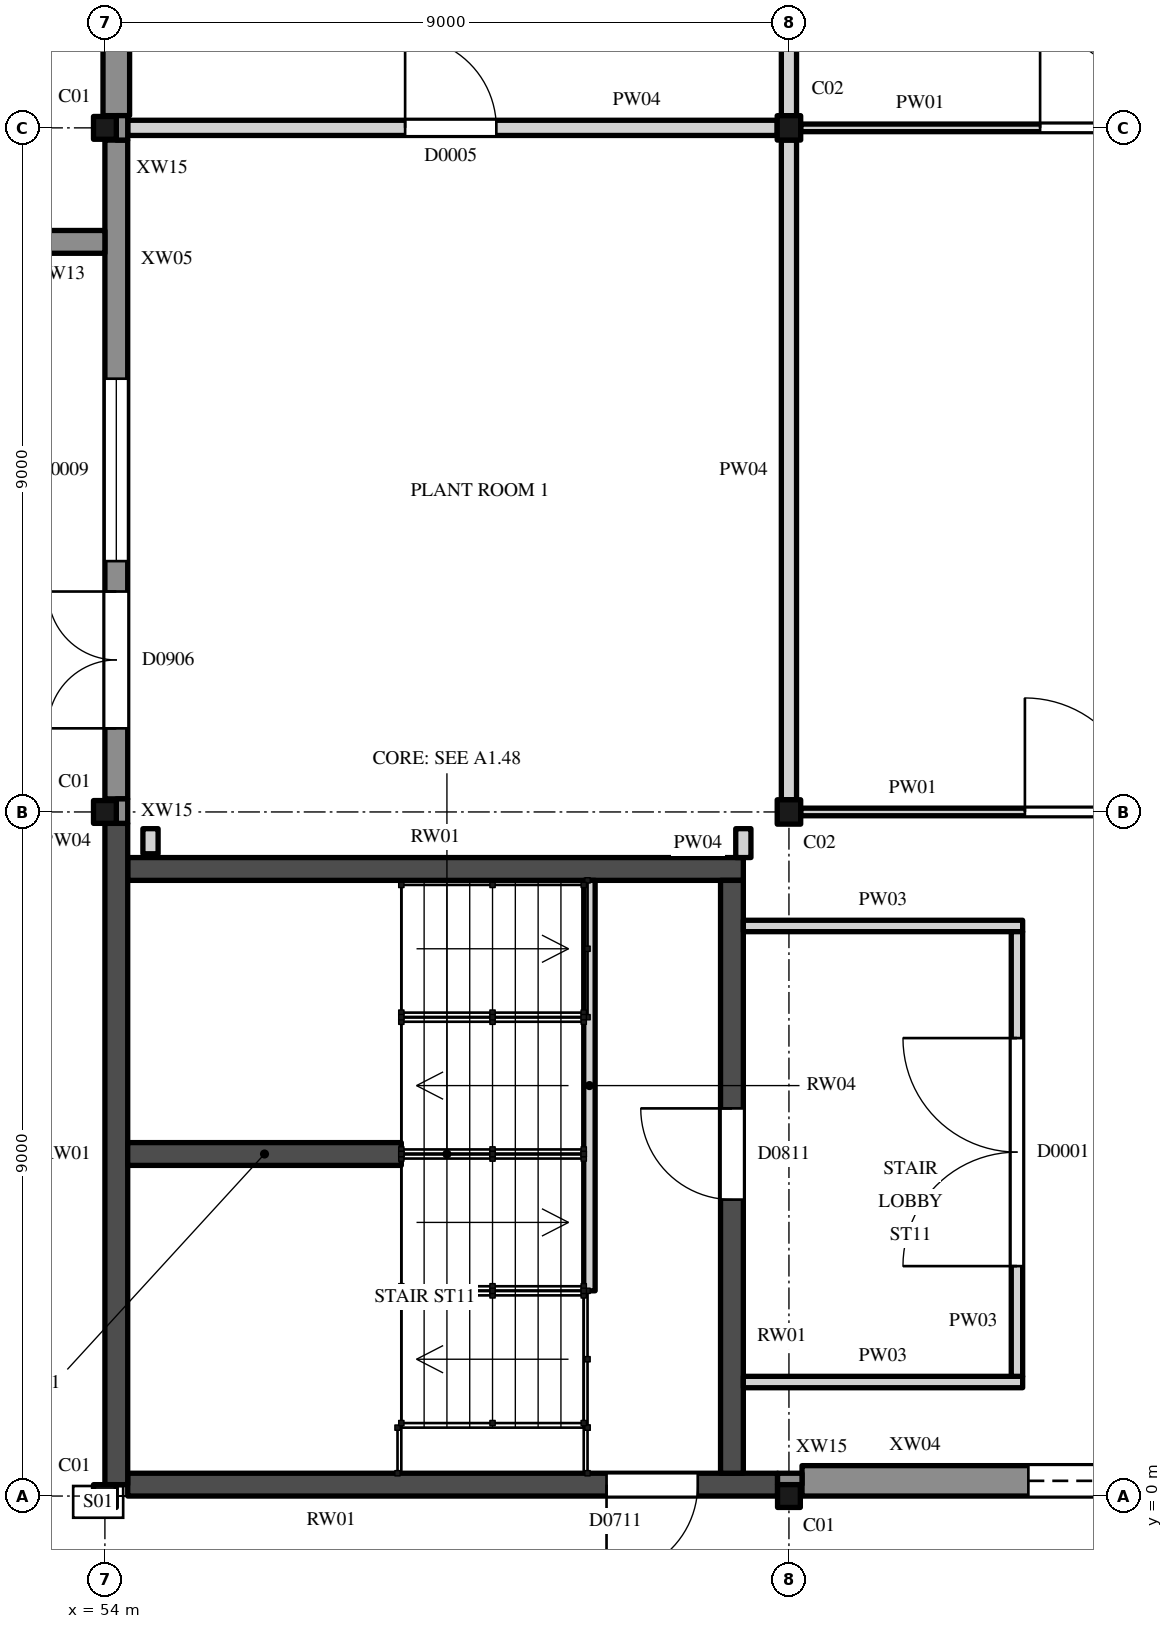
"""IFC4 building model, lengths in metres.
Left out: names, types, materials, properties, quantities, classifications, styles, units other than length and angle.
Written with IfcOpenShell. Run it as: python <this file> out.ifc"""

import sys

from ifc_helpers import new_model, si_unit, direction, frame, frame_2d, origin, origin_2d, place, context, subcontext, project, spatial, polyline, rectangle, hollow_rectangle, i_section, outline, extrude, element, fill, save


model = new_model("IFC4")
c1 = context("Model", 3, precision=1e-05, world=origin(), true_north=direction((0.0, 1.0)))
c2 = subcontext(c1, "Body", "Model", "MODEL_VIEW")
j1 = project(units=[si_unit("LENGTHUNIT", "METRE"), si_unit("PLANEANGLEUNIT", "RADIAN")], contexts=[c1])
p1 = place(None, origin())
s1 = spatial("IfcSite", under=j1, at=p1, CompositionType="ELEMENT")
p2 = place(p1, origin())
s2 = spatial("IfcBuilding", under=s1, at=p2, CompositionType="ELEMENT")
p3 = place(p2, origin())
s3 = spatial("IfcBuildingStorey", under=s2, at=p3, CompositionType="ELEMENT", Elevation=0.0)
for number, where, z_axis, x_axis in (
    (1, (54.0, 0.0, 0.0), (0.0, 0.0, 1.0), (1.0, 0.0, 0.0)),
    (2, (63.0, 0.0, 0.0), (0.0, 0.0, 1.0), (1.0, 0.0, 0.0)),
    (3, (54.0, 9.0, 0.0), (0.0, 0.0, 1.0), (1.0, 0.0, 0.0)),
):
    element("IfcColumn", number, at=place(p3, frame(where, z_axis=z_axis, x_axis=x_axis)), inside=s3, PredefinedType="COLUMN", context=c2, shape_type="SweptSolid", body=[
        extrude(hollow_rectangle(XDim=0.3, YDim=0.3, WallThickness=0.012, InnerFilletRadius=0.019, OuterFilletRadius=0.031, at=origin_2d()), origin(), (0.0, 0.0, 1.0), 6.0),
    ])
p4 = place(p3, frame((63.0, 9.0, 0.0), z_axis=(0.0, 0.0, 1.0), x_axis=(1.0, 0.0, 0.0)))
e4 = element("IfcColumn", 4, at=p4, inside=s3, PredefinedType="COLUMN", context=c2, shape_type="SweptSolid", body=[
    extrude(i_section(OverallWidth=0.309, OverallDepth=0.321, WebThickness=0.014, FlangeThickness=0.022, FilletRadius=0.017, at=origin_2d()), origin(), (0.0, 0.0, 1.0), 6.0),
])
p5 = place(p3, frame((54.0, 18.0, 0.0), z_axis=(0.0, 0.0, 1.0), x_axis=(1.0, 0.0, 0.0)))
e5 = element("IfcColumn", 5, at=p5, inside=s3, PredefinedType="COLUMN", context=c2, shape_type="SweptSolid", body=[
    extrude(hollow_rectangle(XDim=0.3, YDim=0.3, WallThickness=0.012, InnerFilletRadius=0.019, OuterFilletRadius=0.031, at=origin_2d()), origin(), (0.0, 0.0, 1.0), 6.0),
])
p6 = place(p3, frame((63.0, 18.0, 0.0), z_axis=(0.0, 0.0, 1.0), x_axis=(1.0, 0.0, 0.0)))
e6 = element("IfcColumn", 6, at=p6, inside=s3, PredefinedType="COLUMN", context=c2, shape_type="SweptSolid", body=[
    extrude(i_section(OverallWidth=0.309, OverallDepth=0.321, WebThickness=0.014, FlangeThickness=0.022, FilletRadius=0.017, at=origin_2d()), origin(), (0.0, 0.0, 1.0), 6.0),
])
p7 = place(p3, frame((54.3, 0.15, 0.0), z_axis=(0.0, 0.0, 1.0), x_axis=(1.0, 0.0, 0.0)))
e7 = element("IfcWall", 7, at=p7, inside=s3, PredefinedType="SHEAR", context=c2, shape_type="SweptSolid", body=[
    extrude(rectangle(XDim=8.55, YDim=0.3, at=frame_2d((4.275, 0.0))), origin(), (0.0, 0.0, 1.0), 6.0),
])
p8 = place(p7, frame((6.3, 0.0, 0.0)))
e8 = element("IfcOpeningElement", 8, at=p8, cuts=e7, PredefinedType="OPENING", context=c2, shape_type="SweptSolid", body=[
    extrude(rectangle(XDim=1.2, YDim=2.1, at=frame_2d((0.6, 1.05))), frame((0.0, 0.16, 0.0), z_axis=(0.0, -1.0, 0.0), x_axis=(1.0, 0.0, 0.0)), (0.0, 0.0, 1.0), 0.32),
])
p9 = place(p3, frame((54.3, 8.25, 0.0), z_axis=(0.0, 0.0, 1.0), x_axis=(1.0, 0.0, 0.0)))
e9 = element("IfcWall", 9, at=p9, inside=s3, PredefinedType="SHEAR", context=c2, shape_type="SweptSolid", body=[
    extrude(rectangle(XDim=8.1, YDim=0.3, at=frame_2d((4.05, 0.0))), origin(), (0.0, 0.0, 1.0), 6.0),
])
p10 = place(p3, frame((54.15, 0.15, 0.0), z_axis=(0.0, 0.0, 1.0), x_axis=(0.0, 1.0, 0.0)))
e10 = element("IfcWall", 10, at=p10, inside=s3, PredefinedType="SHEAR", context=c2, shape_type="SweptSolid", body=[
    extrude(rectangle(XDim=8.7, YDim=0.3, at=frame_2d((4.35, 0.0))), origin(), (0.0, 0.0, 1.0), 6.0),
])
p11 = place(p3, frame((62.25, 0.3, 0.0), z_axis=(0.0, 0.0, 1.0), x_axis=(0.0, 1.0, 0.0)))
e11 = element("IfcWall", 11, at=p11, inside=s3, PredefinedType="SHEAR", context=c2, shape_type="SweptSolid", body=[
    extrude(rectangle(XDim=7.8, YDim=0.3, at=frame_2d((3.9, 0.0))), origin(), (0.0, 0.0, 1.0), 6.0),
])
p12 = place(p11, frame((3.6, 0.0, 0.0)))
e12 = element("IfcOpeningElement", 12, at=p12, cuts=e11, PredefinedType="OPENING", context=c2, shape_type="SweptSolid", body=[
    extrude(rectangle(XDim=1.2, YDim=2.1, at=frame_2d((0.6, 1.05))), frame((0.0, 0.16, 0.0), z_axis=(0.0, -1.0, 0.0), x_axis=(1.0, 0.0, 0.0)), (0.0, 0.0, 1.0), 0.32),
])
p13 = place(p3, frame((57.9, 4.5, 0.0), z_axis=(0.0, 0.0, 1.0), x_axis=(-1.0, 0.0, 0.0)))
e13 = element("IfcWall", 13, at=p13, inside=s3, PredefinedType="SHEAR", context=c2, shape_type="SweptSolid", body=[
    extrude(rectangle(XDim=3.6, YDim=0.3, at=frame_2d((1.8, 0.0))), origin(), (0.0, 0.0, 1.0), 6.0),
])
p14 = place(p3, frame((60.375, 2.7, 0.0), z_axis=(0.0, 0.0, 1.0), x_axis=(0.0, 1.0, 0.0)))
e14 = element("IfcWall", 14, at=p14, inside=s3, PredefinedType="STANDARD", context=c2, shape_type="SweptSolid", body=[
    extrude(rectangle(XDim=5.4, YDim=0.15, at=frame_2d((2.7, 0.0))), origin(), (0.0, 0.0, 1.0), 2.8),
])
p15 = place(p3, frame((63.172, 0.2, 0.0), z_axis=(0.0, 0.0, 1.0), x_axis=(1.0, 0.0, 0.0)))
e15 = element("IfcWall", 15, at=p15, inside=s3, PredefinedType="SOLIDWALL", context=c2, shape_type="SweptSolid", body=[
    extrude(rectangle(XDim=8.667, YDim=0.4, at=frame_2d((4.333, 0.0))), origin(), (0.0, 0.0, 1.0), 5.419),
])
p16 = place(p15, frame((2.978, 0.0, 0.0)))
e16 = element("IfcOpeningElement", 16, at=p16, cuts=e15, PredefinedType="OPENING", context=c2, shape_type="SweptSolid", body=[
    extrude(rectangle(XDim=4.5, YDim=4.5, at=frame_2d((2.25, 2.25))), frame((0.0, 0.21, 0.0), z_axis=(0.0, -1.0, 0.0), x_axis=(1.0, 0.0, 0.0)), (0.0, 0.0, 1.0), 0.42),
])
p17 = place(p3, frame((54.15, 9.172, 0.0), z_axis=(0.0, 0.0, 1.0), x_axis=(0.0, 1.0, 0.0)))
e17 = element("IfcWall", 17, at=p17, inside=s3, PredefinedType="SOLIDWALL", context=c2, shape_type="SweptSolid", body=[
    extrude(rectangle(XDim=8.667, YDim=0.3, at=frame_2d((4.333, 0.0))), origin(), (0.0, 0.0, 1.0), 5.292),
])
p18 = place(p17, frame((3.128, 0.0, 0.9)))
e18 = element("IfcOpeningElement", 18, at=p18, cuts=e17, PredefinedType="OPENING", context=c2, shape_type="SweptSolid", body=[
    extrude(rectangle(XDim=2.4, YDim=1.8, at=frame_2d((1.2, 0.9))), frame((0.0, 0.16, 0.0), z_axis=(0.0, -1.0, 0.0), x_axis=(1.0, 0.0, 0.0)), (0.0, 0.0, 1.0), 0.32),
])
p19 = place(p17, frame((0.928, 0.0, 0.0)))
e19 = element("IfcOpeningElement", 19, at=p19, cuts=e17, PredefinedType="OPENING", context=c2, shape_type="SweptSolid", body=[
    extrude(rectangle(XDim=1.8, YDim=2.4, at=frame_2d((0.9, 1.2))), frame((0.0, 0.16, 0.0), z_axis=(0.0, -1.0, 0.0), x_axis=(1.0, 0.0, 0.0)), (0.0, 0.0, 1.0), 0.32),
])
p20 = place(p3, frame((54.15, 18.161, 0.0), z_axis=(0.0, 0.0, 1.0), x_axis=(0.0, 1.0, 0.0)))
e20 = element("IfcWall", 20, at=p20, inside=s3, PredefinedType="SOLIDWALL", context=c2, shape_type="SweptSolid", body=[
    extrude(rectangle(XDim=8.667, YDim=0.35, at=frame_2d((4.333, 0.0))), origin(), (0.0, 0.0, 1.0), 5.292),
])
p21 = place(p20, frame((3.439, 0.0, 0.0)))
e21 = element("IfcOpeningElement", 21, at=p21, cuts=e20, PredefinedType="OPENING", context=c2, shape_type="SweptSolid", body=[
    extrude(rectangle(XDim=1.8, YDim=2.4, at=frame_2d((0.9, 1.2))), frame((0.0, 0.185, 0.0), z_axis=(0.0, -1.0, 0.0), x_axis=(1.0, 0.0, 0.0)), (0.0, 0.0, 1.0), 0.37),
])
for number, where, z_axis, x_axis in (
    (22, (62.85, 0.225, 0.0), (0.0, 0.0, 1.0), (1.0, 0.0, 0.0)),
    (23, (54.225, 8.85, 0.0), (0.0, 0.0, 1.0), (0.0, 1.0, 0.0)),
):
    element("IfcWall", number, at=place(p3, frame(where, z_axis=z_axis, x_axis=x_axis)), inside=s3, PredefinedType="SOLIDWALL", context=c2, shape_type="SweptSolid", body=[
        extrude(rectangle(XDim=0.322, YDim=0.15, at=frame_2d((0.161, 0.0))), origin(), (0.0, 0.0, 1.0), 6.0),
    ])
p22 = place(p3, frame((54.225, 17.839, 0.0), z_axis=(0.0, 0.0, 1.0), x_axis=(0.0, 1.0, 0.0)))
e24 = element("IfcWall", 24, at=p22, inside=s3, PredefinedType="SOLIDWALL", context=c2, shape_type="SweptSolid", body=[
    extrude(rectangle(XDim=0.322, YDim=0.15, at=frame_2d((0.161, 0.0))), origin(), (0.0, 0.0, 1.0), 5.292),
])
p23 = place(p3, frame((54.0, 16.5, 0.0), z_axis=(0.0, 0.0, 1.0), x_axis=(-1.0, 0.0, 0.0)))
e25 = element("IfcWall", 25, at=p23, inside=s3, PredefinedType="SOLIDWALL", context=c2, shape_type="SweptSolid", body=[
    extrude(outline(polyline([(0.0, 0.0), (1.2, 0.0), (1.2, 1.2), (0.0, 4.0), (0.0, 0.0)])), frame((0.0, 0.15, 0.0), z_axis=(0.0, -1.0, 0.0), x_axis=(1.0, 0.0, 0.0)), (0.0, 0.0, 1.0), 0.3),
])
for number, where, z_axis, x_axis in (
    (26, (62.4, 1.5, 0.0), (0.0, 0.0, 1.0), (1.0, 0.0, 0.0)),
    (27, (62.4, 7.5, 0.0), (0.0, 0.0, 1.0), (1.0, 0.0, 0.0)),
):
    element("IfcWall", number, at=place(p3, frame(where, z_axis=z_axis, x_axis=x_axis)), inside=s3, PredefinedType="PARTITIONING", context=c2, shape_type="SweptSolid", body=[
        extrude(rectangle(XDim=3.675, YDim=0.15, at=frame_2d((1.837, 0.0))), origin(), (0.0, 0.0, 1.0), 5.825),
    ])
p24 = place(p3, frame((63.155, 9.0, 0.0), z_axis=(0.0, 0.0, 1.0), x_axis=(1.0, 0.0, 0.0)))
e28 = element("IfcWall", 28, at=p24, inside=s3, PredefinedType="PARTITIONING", context=c2, shape_type="SweptSolid", body=[
    extrude(rectangle(XDim=8.691, YDim=0.1, at=frame_2d((4.345, 0.0))), origin(), (0.0, 0.0, 1.0), 5.419),
])
p25 = place(p24, frame((2.95, 0.0, 0.0)))
e29 = element("IfcOpeningElement", 29, at=p25, cuts=e28, PredefinedType="OPENING", context=c2, shape_type="SweptSolid", body=[
    extrude(rectangle(XDim=3.0, YDim=3.6, at=frame_2d((1.5, 1.8))), frame((0.0, 0.06, 0.0), z_axis=(0.0, -1.0, 0.0), x_axis=(1.0, 0.0, 0.0)), (0.0, 0.0, 1.0), 0.12),
])
p26 = place(p3, frame((54.3, 18.0, 0.0), z_axis=(0.0, 0.0, 1.0), x_axis=(1.0, 0.0, 0.0)))
e30 = element("IfcWall", 30, at=p26, inside=s3, PredefinedType="PARTITIONING", context=c2, shape_type="SweptSolid", body=[
    extrude(rectangle(XDim=8.545, YDim=0.2, at=frame_2d((4.273, 0.0))), origin(), (0.0, 0.0, 1.0), 5.419),
])
p27 = place(p26, frame((3.65, 0.0, 0.0)))
e31 = element("IfcOpeningElement", 31, at=p27, cuts=e30, PredefinedType="OPENING", context=c2, shape_type="SweptSolid", body=[
    extrude(rectangle(XDim=1.2, YDim=2.4, at=frame_2d((0.6, 1.2))), frame((0.0, 0.11, 0.0), z_axis=(0.0, -1.0, 0.0), x_axis=(1.0, 0.0, 0.0)), (0.0, 0.0, 1.0), 0.22),
])
p28 = place(p3, frame((63.155, 18.0, 0.0), z_axis=(0.0, 0.0, 1.0), x_axis=(1.0, 0.0, 0.0)))
e32 = element("IfcWall", 32, at=p28, inside=s3, PredefinedType="PARTITIONING", context=c2, shape_type="SweptSolid", body=[
    extrude(rectangle(XDim=8.691, YDim=0.1, at=frame_2d((4.345, 0.0))), origin(), (0.0, 0.0, 1.0), 5.419),
])
p29 = place(p28, frame((3.15, 0.0, 0.0)))
e33 = element("IfcOpeningElement", 33, at=p29, cuts=e32, PredefinedType="OPENING", context=c2, shape_type="SweptSolid", body=[
    extrude(rectangle(XDim=2.4, YDim=3.0, at=frame_2d((1.2, 1.5))), frame((0.0, 0.06, 0.0), z_axis=(0.0, -1.0, 0.0), x_axis=(1.0, 0.0, 0.0)), (0.0, 0.0, 1.0), 0.12),
])
p30 = place(p3, frame((54.6, 8.45, 0.0), z_axis=(0.0, 0.0, 1.0), x_axis=(0.0, 1.0, 0.0)))
e34 = element("IfcWall", 34, at=p30, inside=s3, PredefinedType="PARTITIONING", context=c2, shape_type="SweptSolid", body=[
    extrude(rectangle(XDim=0.33, YDim=0.2, at=frame_2d((0.165, 0.0))), origin(), (0.0, 0.0, 1.0), 5.825),
])
p31 = place(p3, frame((62.4, 8.4, 0.0), z_axis=(0.0, 0.0, 1.0), x_axis=(0.0, 1.0, 0.0)))
e35 = element("IfcWall", 35, at=p31, inside=s3, PredefinedType="PARTITIONING", context=c2, shape_type="SweptSolid", body=[
    extrude(rectangle(XDim=0.38, YDim=0.2, at=frame_2d((0.19, 0.0))), origin(), (0.0, 0.0, 1.0), 5.825),
])
for number, where, z_axis, x_axis in (
    (36, (63.0, 9.16, 0.0), (0.0, 0.0, 1.0), (0.0, 1.0, 0.0)),
    (37, (63.0, 18.16, 0.0), (0.0, 0.0, 1.0), (0.0, 1.0, 0.0)),
):
    element("IfcWall", number, at=place(p3, frame(where, z_axis=z_axis, x_axis=x_axis)), inside=s3, PredefinedType="PARTITIONING", context=c2, shape_type="SweptSolid", body=[
        extrude(rectangle(XDim=8.679, YDim=0.2, at=frame_2d((4.34, 0.0))), origin(), (0.0, 0.0, 1.0), 5.292),
    ])
p32 = place(p3, frame((66.0, 1.575, 0.0), z_axis=(0.0, 0.0, 1.0), x_axis=(0.0, 1.0, 0.0)))
e38 = element("IfcWall", 38, at=p32, inside=s3, PredefinedType="PARTITIONING", context=c2, shape_type="SweptSolid", body=[
    extrude(rectangle(XDim=5.85, YDim=0.15, at=frame_2d((2.925, 0.0))), origin(), (0.0, 0.0, 1.0), 5.825),
])
p33 = place(p32, frame((1.45, 0.0, 0.0)))
e39 = element("IfcOpeningElement", 39, at=p33, cuts=e38, PredefinedType="OPENING", context=c2, shape_type="SweptSolid", body=[
    extrude(rectangle(XDim=3.0, YDim=3.6, at=frame_2d((1.5, 1.8))), frame((0.0, 0.085, 0.0), z_axis=(0.0, -1.0, 0.0), x_axis=(1.0, 0.0, 0.0)), (0.0, 0.0, 1.0), 0.17),
])
p34 = place(p12, origin())
e40 = element("IfcDoor", 40, at=p34, inside=s3, OperationType="SINGLE_SWING_LEFT", PredefinedType="DOOR", context=c2, shape_type="SweptSolid", body=[
    extrude(rectangle(XDim=1.2, YDim=2.1, at=frame_2d((0.6, 1.05))), frame((0.0, 0.025, 0.0), z_axis=(0.0, -1.0, 0.0), x_axis=(1.0, 0.0, 0.0)), (0.0, 0.0, 1.0), 0.05),
])
fill(e12, e40)
p35 = place(p8, frame((1.2, 0.0, 0.0), z_axis=(0.0, 0.0, 1.0), x_axis=(-1.0, 0.0, 0.0)))
e41 = element("IfcDoor", 41, at=p35, inside=s3, OperationType="SINGLE_SWING_LEFT", PredefinedType="DOOR", context=c2, shape_type="SweptSolid", body=[
    extrude(rectangle(XDim=1.2, YDim=2.1, at=frame_2d((0.6, 1.05))), frame((0.0, 0.025, 0.0), z_axis=(0.0, -1.0, 0.0), x_axis=(1.0, 0.0, 0.0)), (0.0, 0.0, 1.0), 0.05),
])
fill(e8, e41)
p36 = place(p18, origin())
e42 = element("IfcWindow", 42, at=p36, inside=s3, PartitioningType="TRIPLE_PANEL_VERTICAL", PredefinedType="WINDOW", context=c2, shape_type="SweptSolid", body=[
    extrude(rectangle(XDim=2.4, YDim=1.8, at=frame_2d((1.2, 0.9))), frame((0.0, 0.03, 0.0), z_axis=(0.0, -1.0, 0.0), x_axis=(1.0, 0.0, 0.0)), (0.0, 0.0, 1.0), 0.06),
])
fill(e18, e42)
p37 = place(p16, frame((4.5, 0.0, 0.0), z_axis=(0.0, 0.0, 1.0), x_axis=(-1.0, 0.0, 0.0)))
e43 = element("IfcDoor", 43, at=p37, inside=s3, OperationType="ROLLINGUP", PredefinedType="DOOR", context=c2, shape_type="SweptSolid", body=[
    extrude(rectangle(XDim=4.5, YDim=4.5, at=frame_2d((2.25, 2.25))), frame((0.0, 0.025, 0.0), z_axis=(0.0, -1.0, 0.0), x_axis=(1.0, 0.0, 0.0)), (0.0, 0.0, 1.0), 0.05),
])
fill(e16, e43)
p38 = place(p19, origin())
e44 = element("IfcDoor", 44, at=p38, inside=s3, OperationType="DOUBLE_DOOR_SINGLE_SWING", PredefinedType="DOOR", context=c2, shape_type="SweptSolid", body=[
    extrude(rectangle(XDim=1.8, YDim=2.4, at=frame_2d((0.9, 1.2))), frame((0.0, 0.025, 0.0), z_axis=(0.0, -1.0, 0.0), x_axis=(1.0, 0.0, 0.0)), (0.0, 0.0, 1.0), 0.05),
])
fill(e19, e44)
p39 = place(p33, origin())
e45 = element("IfcDoor", 45, at=p39, inside=s3, OperationType="DOUBLE_DOOR_SINGLE_SWING", PredefinedType="DOOR", context=c2, shape_type="SweptSolid", body=[
    extrude(rectangle(XDim=3.0, YDim=3.6, at=frame_2d((1.5, 1.8))), frame((0.0, 0.025, 0.0), z_axis=(0.0, -1.0, 0.0), x_axis=(1.0, 0.0, 0.0)), (0.0, 0.0, 1.0), 0.05),
])
fill(e39, e45)
p40 = place(p25, origin())
e46 = element("IfcDoor", 46, at=p40, inside=s3, OperationType="DOUBLE_DOOR_SINGLE_SWING", PredefinedType="DOOR", context=c2, shape_type="SweptSolid", body=[
    extrude(rectangle(XDim=3.0, YDim=3.6, at=frame_2d((1.5, 1.8))), frame((0.0, 0.025, 0.0), z_axis=(0.0, -1.0, 0.0), x_axis=(1.0, 0.0, 0.0)), (0.0, 0.0, 1.0), 0.05),
])
fill(e29, e46)
p41 = place(p27, origin())
e47 = element("IfcDoor", 47, at=p41, inside=s3, OperationType="SINGLE_SWING_RIGHT", PredefinedType="DOOR", context=c2, shape_type="SweptSolid", body=[
    extrude(rectangle(XDim=1.2, YDim=2.4, at=frame_2d((0.6, 1.2))), frame((0.0, 0.025, 0.0), z_axis=(0.0, -1.0, 0.0), x_axis=(1.0, 0.0, 0.0)), (0.0, 0.0, 1.0), 0.05),
])
fill(e31, e47)
p42 = place(p29, origin())
e48 = element("IfcDoor", 48, at=p42, inside=s3, OperationType="DOUBLE_DOOR_SINGLE_SWING", PredefinedType="DOOR", context=c2, shape_type="SweptSolid", body=[
    extrude(rectangle(XDim=2.4, YDim=3.0, at=frame_2d((1.2, 1.5))), frame((0.0, 0.025, 0.0), z_axis=(0.0, -1.0, 0.0), x_axis=(1.0, 0.0, 0.0)), (0.0, 0.0, 1.0), 0.05),
])
fill(e33, e48)
save(model, sys.argv[1])
